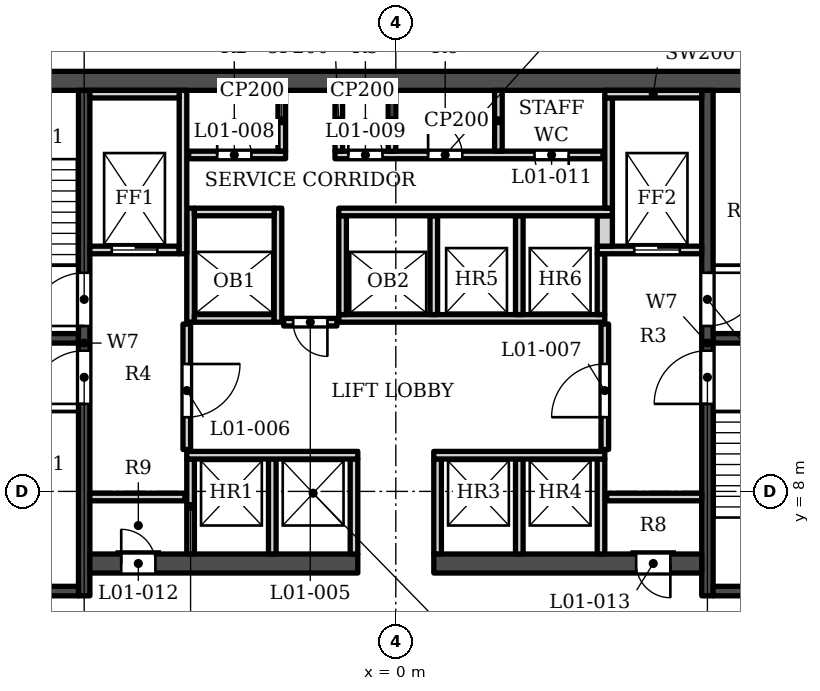
"""IFC4 building model, lengths in metres.
Left out: names, types, materials, properties, quantities, classifications, styles, units other than length and angle.
Written with IfcOpenShell. Run it as: python <this file> out.ifc"""

import sys

from ifc_helpers import new_model, si_unit, direction, frame, frame_2d, origin, place, context, subcontext, project, spatial, rectangle, extrude, element, fill, save


model = new_model("IFC4")
c1 = context("Model", 3, precision=1e-05, world=origin(), true_north=direction((0.0, 1.0)))
c2 = subcontext(c1, "Body", "Model", "MODEL_VIEW")
j1 = project(units=[si_unit("LENGTHUNIT", "METRE"), si_unit("PLANEANGLEUNIT", "RADIAN")], contexts=[c1])
p1 = place(None, origin())
s1 = spatial("IfcSite", under=j1, at=p1, CompositionType="ELEMENT")
p2 = place(p1, origin())
s2 = spatial("IfcBuilding", under=s1, at=p2, CompositionType="ELEMENT")
p3 = place(p2, frame((0.0, 0.0, 9.0)))
s3 = spatial("IfcBuildingStorey", under=s2, at=p3, CompositionType="ELEMENT", Elevation=9.0)
p4 = place(p3, frame((-16.9, 18.802, 0.0), z_axis=(0.0, 0.0, 1.0), x_axis=(1.0, 0.0, 0.0)))
e1 = element("IfcWall", 1, at=p4, inside=s3, PredefinedType="SHEAR", context=c2, shape_type="SweptSolid", body=[
    extrude(rectangle(XDim=33.8, YDim=0.5, at=frame_2d((16.9, 0.0))), origin(), (0.0, 0.0, 1.0), 11.0),
])
p5 = place(p3, frame((-8.2, 5.253, 0.0), z_axis=(0.0, 0.0, 1.0), x_axis=(0.0, 1.0, 0.0)))
e2 = element("IfcWall", 2, at=p5, inside=s3, PredefinedType="SHEAR", context=c2, shape_type="SweptSolid", body=[
    extrude(rectangle(XDim=13.3, YDim=0.3, at=frame_2d((6.65, 0.0))), origin(), (0.0, 0.0, 1.0), 11.0),
])
p6 = place(p5, frame((7.1, 0.0, 0.0)))
e3 = element("IfcOpeningElement", 3, at=p6, cuts=e2, PredefinedType="OPENING", context=c2, shape_type="SweptSolid", body=[
    extrude(rectangle(XDim=1.4, YDim=2.1, at=frame_2d((0.7, 1.05))), frame((0.0, 0.16, 0.0), z_axis=(0.0, -1.0, 0.0), x_axis=(1.0, 0.0, 0.0)), (0.0, 0.0, 1.0), 0.32),
])
p7 = place(p5, frame((5.05, 0.0, 0.0)))
e4 = element("IfcOpeningElement", 4, at=p7, cuts=e2, PredefinedType="OPENING", context=c2, shape_type="SweptSolid", body=[
    extrude(rectangle(XDim=1.4, YDim=2.1, at=frame_2d((0.7, 1.05))), frame((0.0, 0.16, 0.0), z_axis=(0.0, -1.0, 0.0), x_axis=(1.0, 0.0, 0.0)), (0.0, 0.0, 1.0), 0.32),
])
for number, where, z_axis, x_axis in (
    (5, (-12.1, 12.028, 0.0), (0.0, 0.0, 1.0), (1.0, 0.0, 0.0)),
    (6, (-12.1, 5.378, 0.0), (0.0, 0.0, 1.0), (1.0, 0.0, 0.0)),
):
    element("IfcWall", number, at=place(p3, frame(where, z_axis=z_axis, x_axis=x_axis)), inside=s3, PredefinedType="SHEAR", context=c2, shape_type="SweptSolid", body=[
        extrude(rectangle(XDim=3.75, YDim=0.25, at=frame_2d((1.875, 0.0))), origin(), (0.0, 0.0, 1.0), 11.0),
    ])
p8 = place(p3, frame((8.2, 5.253, 0.0), z_axis=(0.0, 0.0, 1.0), x_axis=(0.0, 1.0, 0.0)))
e7 = element("IfcWall", 7, at=p8, inside=s3, PredefinedType="SHEAR", context=c2, shape_type="SweptSolid", body=[
    extrude(rectangle(XDim=13.3, YDim=0.3, at=frame_2d((6.65, 0.0))), origin(), (0.0, 0.0, 1.0), 11.0),
])
p9 = place(p8, frame((7.1, 0.0, 0.0)))
e8 = element("IfcOpeningElement", 8, at=p9, cuts=e7, PredefinedType="OPENING", context=c2, shape_type="SweptSolid", body=[
    extrude(rectangle(XDim=1.4, YDim=2.1, at=frame_2d((0.7, 1.05))), frame((0.0, 0.16, 0.0), z_axis=(0.0, -1.0, 0.0), x_axis=(1.0, 0.0, 0.0)), (0.0, 0.0, 1.0), 0.32),
])
p10 = place(p8, frame((5.05, 0.0, 0.0)))
e9 = element("IfcOpeningElement", 9, at=p10, cuts=e7, PredefinedType="OPENING", context=c2, shape_type="SweptSolid", body=[
    extrude(rectangle(XDim=1.4, YDim=2.1, at=frame_2d((0.7, 1.05))), frame((0.0, 0.16, 0.0), z_axis=(0.0, -1.0, 0.0), x_axis=(1.0, 0.0, 0.0)), (0.0, 0.0, 1.0), 0.32),
])
for number, where, z_axis, x_axis in (
    (10, (8.35, 12.028, 0.0), (0.0, 0.0, 1.0), (1.0, 0.0, 0.0)),
    (11, (8.35, 5.378, 0.0), (0.0, 0.0, 1.0), (1.0, 0.0, 0.0)),
):
    element("IfcWall", number, at=place(p3, frame(where, z_axis=z_axis, x_axis=x_axis)), inside=s3, PredefinedType="SHEAR", context=c2, shape_type="SweptSolid", body=[
        extrude(rectangle(XDim=3.75, YDim=0.25, at=frame_2d((1.875, 0.0))), origin(), (0.0, 0.0, 1.0), 11.0),
    ])
p11 = place(p3, frame((-8.05, 6.103, 0.0), z_axis=(0.0, 0.0, 1.0), x_axis=(1.0, 0.0, 0.0)))
e12 = element("IfcWall", 12, at=p11, inside=s3, PredefinedType="SHEAR", context=c2, shape_type="SweptSolid", body=[
    extrude(rectangle(XDim=7.05, YDim=0.5, at=frame_2d((3.525, 0.0))), origin(), (0.0, 0.0, 1.0), 11.0),
])
p12 = place(p11, frame((0.825, 0.0, 0.0)))
e13 = element("IfcOpeningElement", 13, at=p12, cuts=e12, PredefinedType="OPENING", context=c2, shape_type="SweptSolid", body=[
    extrude(rectangle(XDim=0.9, YDim=2.1, at=frame_2d((0.45, 1.05))), frame((0.0, 0.26, 0.0), z_axis=(0.0, -1.0, 0.0), x_axis=(1.0, 0.0, 0.0)), (0.0, 0.0, 1.0), 0.52),
])
p13 = place(p3, frame((1.0, 6.103, 0.0), z_axis=(0.0, 0.0, 1.0), x_axis=(1.0, 0.0, 0.0)))
e14 = element("IfcWall", 14, at=p13, inside=s3, PredefinedType="SHEAR", context=c2, shape_type="SweptSolid", body=[
    extrude(rectangle(XDim=7.05, YDim=0.5, at=frame_2d((3.525, 0.0))), origin(), (0.0, 0.0, 1.0), 11.0),
])
p14 = place(p13, frame((5.325, 0.0, 0.0)))
e15 = element("IfcOpeningElement", 15, at=p14, cuts=e14, PredefinedType="OPENING", context=c2, shape_type="SweptSolid", body=[
    extrude(rectangle(XDim=0.9, YDim=2.1, at=frame_2d((0.45, 1.05))), frame((0.0, 0.26, 0.0), z_axis=(0.0, -1.0, 0.0), x_axis=(1.0, 0.0, 0.0)), (0.0, 0.0, 1.0), 0.52),
])
for number, where, z_axis, x_axis in (
    (16, (-5.4, 6.353, 0.0), (0.0, 0.0, 1.0), (0.0, 1.0, 0.0)),
    (17, (-3.25, 6.353, 0.0), (0.0, 0.0, 1.0), (0.0, 1.0, 0.0)),
    (18, (-1.1, 6.353, 0.0), (0.0, 0.0, 1.0), (0.0, 1.0, 0.0)),
    (19, (1.1, 6.353, 0.0), (0.0, 0.0, 1.0), (0.0, 1.0, 0.0)),
    (20, (3.25, 6.353, 0.0), (0.0, 0.0, 1.0), (0.0, 1.0, 0.0)),
    (21, (5.4, 6.353, 0.0), (0.0, 0.0, 1.0), (0.0, 1.0, 0.0)),
    (22, (-8.05, 7.853, 0.0), (0.0, 0.0, 1.0), (1.0, 0.0, 0.0)),
    (23, (5.55, 7.853, 0.0), (0.0, 0.0, 1.0), (1.0, 0.0, 0.0)),
):
    element("IfcWall", number, at=place(p3, frame(where, z_axis=z_axis, x_axis=x_axis)), inside=s3, PredefinedType="SOLIDWALL", context=c2, shape_type="SweptSolid", body=[
        extrude(rectangle(XDim=2.5, YDim=0.2, at=frame_2d((1.25, 0.0))), origin(), (0.0, 0.0, 1.0), 10.5),
    ])
for number, where, z_axis, x_axis in (
    (24, (-5.5, 8.953, 0.0), (0.0, 0.0, 1.0), (1.0, 0.0, 0.0)),
    (25, (1.0, 8.953, 0.0), (0.0, 0.0, 1.0), (1.0, 0.0, 0.0)),
):
    element("IfcWall", number, at=place(p3, frame(where, z_axis=z_axis, x_axis=x_axis)), inside=s3, PredefinedType="SOLIDWALL", context=c2, shape_type="SweptSolid", body=[
        extrude(rectangle(XDim=4.5, YDim=0.2, at=frame_2d((2.25, 0.0))), origin(), (0.0, 0.0, 1.0), 10.5),
    ])
p15 = place(p3, frame((-5.5, 9.103, 0.0), z_axis=(0.0, 0.0, 1.0), x_axis=(0.0, 1.0, 0.0)))
e26 = element("IfcWall", 26, at=p15, inside=s3, PredefinedType="SOLIDWALL", context=c2, shape_type="SweptSolid", body=[
    extrude(rectangle(XDim=3.3, YDim=0.2, at=frame_2d((1.65, 0.0))), origin(), (0.0, 0.0, 1.0), 10.5),
])
p16 = place(p15, frame((0.85, 0.0, 0.0)))
e27 = element("IfcOpeningElement", 27, at=p16, cuts=e26, PredefinedType="OPENING", context=c2, shape_type="SweptSolid", body=[
    extrude(rectangle(XDim=1.4, YDim=2.1, at=frame_2d((0.7, 1.05))), frame((0.0, 0.11, 0.0), z_axis=(0.0, -1.0, 0.0), x_axis=(1.0, 0.0, 0.0)), (0.0, 0.0, 1.0), 0.22),
])
p17 = place(p3, frame((5.5, 9.103, 0.0), z_axis=(0.0, 0.0, 1.0), x_axis=(0.0, 1.0, 0.0)))
e28 = element("IfcWall", 28, at=p17, inside=s3, PredefinedType="SOLIDWALL", context=c2, shape_type="SweptSolid", body=[
    extrude(rectangle(XDim=3.3, YDim=0.2, at=frame_2d((1.65, 0.0))), origin(), (0.0, 0.0, 1.0), 10.5),
])
p18 = place(p17, frame((0.85, 0.0, 0.0)))
e29 = element("IfcOpeningElement", 29, at=p18, cuts=e28, PredefinedType="OPENING", context=c2, shape_type="SweptSolid", body=[
    extrude(rectangle(XDim=1.4, YDim=2.1, at=frame_2d((0.7, 1.05))), frame((0.0, 0.11, 0.0), z_axis=(0.0, -1.0, 0.0), x_axis=(1.0, 0.0, 0.0)), (0.0, 0.0, 1.0), 0.22),
])
p19 = place(p3, frame((-2.95, 12.453, 0.0), z_axis=(0.0, 0.0, 1.0), x_axis=(1.0, 0.0, 0.0)))
e30 = element("IfcWall", 30, at=p19, inside=s3, PredefinedType="SOLIDWALL", context=c2, shape_type="SweptSolid", body=[
    extrude(rectangle(XDim=1.4, YDim=0.2, at=frame_2d((0.7, 0.0))), origin(), (0.0, 0.0, 1.0), 10.5),
])
p20 = place(p19, frame((0.25, 0.0, 0.0)))
e31 = element("IfcOpeningElement", 31, at=p20, cuts=e30, PredefinedType="OPENING", context=c2, shape_type="SweptSolid", body=[
    extrude(rectangle(XDim=0.9, YDim=2.1, at=frame_2d((0.45, 1.05))), frame((0.0, 0.11, 0.0), z_axis=(0.0, -1.0, 0.0), x_axis=(1.0, 0.0, 0.0)), (0.0, 0.0, 1.0), 0.22),
])
p21 = place(p3, frame((-5.4, 12.453, 0.0), z_axis=(0.0, 0.0, 1.0), x_axis=(0.0, 1.0, 0.0)))
e32 = element("IfcWall", 32, at=p21, inside=s3, PredefinedType="SOLIDWALL", context=c2, shape_type="SweptSolid", body=[
    extrude(rectangle(XDim=3.0, YDim=0.2, at=frame_2d((1.5, 0.0))), origin(), (0.0, 0.0, 1.0), 10.5),
])
p22 = place(p3, frame((-5.3, 12.552, 0.0), z_axis=(0.0, 0.0, 1.0), x_axis=(1.0, 0.0, 0.0)))
e33 = element("IfcWall", 33, at=p22, inside=s3, PredefinedType="SOLIDWALL", context=c2, shape_type="SweptSolid", body=[
    extrude(rectangle(XDim=2.1, YDim=0.2, at=frame_2d((1.05, 0.0))), origin(), (0.0, 0.0, 1.0), 10.5),
])
p23 = place(p3, frame((-3.1, 12.453, 0.0), z_axis=(0.0, 0.0, 1.0), x_axis=(0.0, 1.0, 0.0)))
e34 = element("IfcWall", 34, at=p23, inside=s3, PredefinedType="SOLIDWALL", context=c2, shape_type="SweptSolid", body=[
    extrude(rectangle(XDim=3.0, YDim=0.2, at=frame_2d((1.5, 0.0))), origin(), (0.0, 0.0, 1.0), 10.5),
])
p24 = place(p3, frame((-1.5, 12.552, 0.0), z_axis=(0.0, 0.0, 1.0), x_axis=(1.0, 0.0, 0.0)))
e35 = element("IfcWall", 35, at=p24, inside=s3, PredefinedType="SOLIDWALL", context=c2, shape_type="SweptSolid", body=[
    extrude(rectangle(XDim=7.0, YDim=0.2, at=frame_2d((3.5, 0.0))), origin(), (0.0, 0.0, 1.0), 10.5),
])
for number, where, z_axis, x_axis in (
    (36, (-1.4, 12.653, 0.0), (0.0, 0.0, 1.0), (0.0, 1.0, 0.0)),
    (37, (1.0, 12.653, 0.0), (0.0, 0.0, 1.0), (0.0, 1.0, 0.0)),
    (38, (3.25, 12.653, 0.0), (0.0, 0.0, 1.0), (0.0, 1.0, 0.0)),
):
    element("IfcWall", number, at=place(p3, frame(where, z_axis=z_axis, x_axis=x_axis)), inside=s3, PredefinedType="SOLIDWALL", context=c2, shape_type="SweptSolid", body=[
        extrude(rectangle(XDim=2.6, YDim=0.2, at=frame_2d((1.3, 0.0))), origin(), (0.0, 0.0, 1.0), 10.5),
    ])
p25 = place(p3, frame((5.4, 12.653, 0.0), z_axis=(0.0, 0.0, 1.0), x_axis=(0.0, 1.0, 0.0)))
e39 = element("IfcWall", 39, at=p25, inside=s3, PredefinedType="SOLIDWALL", context=c2, shape_type="SweptSolid", body=[
    extrude(rectangle(XDim=1.6, YDim=0.2, at=frame_2d((0.8, 0.0))), origin(), (0.0, 0.0, 1.0), 10.5),
])
p26 = place(p3, frame((-8.05, 14.353, 0.0), z_axis=(0.0, 0.0, 1.0), x_axis=(1.0, 0.0, 0.0)))
e40 = element("IfcWall", 40, at=p26, inside=s3, PredefinedType="SOLIDWALL", context=c2, shape_type="SweptSolid", body=[
    extrude(rectangle(XDim=2.35, YDim=0.2, at=frame_2d((1.175, 0.0))), origin(), (0.0, 0.0, 1.0), 10.5),
])
p27 = place(p26, frame((0.575, 0.0, 0.0)))
e41 = element("IfcOpeningElement", 41, at=p27, cuts=e40, PredefinedType="OPENING", context=c2, shape_type="SweptSolid", body=[
    extrude(rectangle(XDim=1.2, YDim=2.1, at=frame_2d((0.6, 1.05))), frame((0.0, 0.11, 0.0), z_axis=(0.0, -1.0, 0.0), x_axis=(1.0, 0.0, 0.0)), (0.0, 0.0, 1.0), 0.22),
])
p28 = place(p3, frame((-5.6, 14.253, 0.0), z_axis=(0.0, 0.0, 1.0), x_axis=(0.0, 1.0, 0.0)))
e42 = element("IfcWall", 42, at=p28, inside=s3, PredefinedType="SOLIDWALL", context=c2, shape_type="SweptSolid", body=[
    extrude(rectangle(XDim=4.3, YDim=0.2, at=frame_2d((2.15, 0.0))), origin(), (0.0, 0.0, 1.0), 10.5),
])
p29 = place(p3, frame((5.3, 14.353, 0.0), z_axis=(0.0, 0.0, 1.0), x_axis=(1.0, 0.0, 0.0)))
e43 = element("IfcWall", 43, at=p29, inside=s3, PredefinedType="SOLIDWALL", context=c2, shape_type="SweptSolid", body=[
    extrude(rectangle(XDim=2.75, YDim=0.2, at=frame_2d((1.375, 0.0))), origin(), (0.0, 0.0, 1.0), 10.5),
])
p30 = place(p29, frame((0.975, 0.0, 0.0)))
e44 = element("IfcOpeningElement", 44, at=p30, cuts=e43, PredefinedType="OPENING", context=c2, shape_type="SweptSolid", body=[
    extrude(rectangle(XDim=1.2, YDim=2.1, at=frame_2d((0.6, 1.05))), frame((0.0, 0.11, 0.0), z_axis=(0.0, -1.0, 0.0), x_axis=(1.0, 0.0, 0.0)), (0.0, 0.0, 1.0), 0.22),
])
p31 = place(p3, frame((5.5, 14.453, 0.0), z_axis=(0.0, 0.0, 1.0), x_axis=(0.0, 1.0, 0.0)))
e45 = element("IfcWall", 45, at=p31, inside=s3, PredefinedType="SOLIDWALL", context=c2, shape_type="SweptSolid", body=[
    extrude(rectangle(XDim=0.8, YDim=0.4, at=frame_2d((0.4, 0.0))), origin(), (0.0, 0.0, 1.0), 10.5),
])
p32 = place(p3, frame((-5.3, 15.353, 0.0), z_axis=(0.0, 0.0, 1.0), x_axis=(1.0, 0.0, 0.0)))
e46 = element("IfcWall", 46, at=p32, inside=s3, PredefinedType="SOLIDWALL", context=c2, shape_type="SweptSolid", body=[
    extrude(rectangle(XDim=2.1, YDim=0.2, at=frame_2d((1.05, 0.0))), origin(), (0.0, 0.0, 1.0), 10.5),
])
p33 = place(p3, frame((-1.5, 15.353, 0.0), z_axis=(0.0, 0.0, 1.0), x_axis=(1.0, 0.0, 0.0)))
e47 = element("IfcWall", 47, at=p33, inside=s3, PredefinedType="SOLIDWALL", context=c2, shape_type="SweptSolid", body=[
    extrude(rectangle(XDim=7.2, YDim=0.2, at=frame_2d((3.6, 0.0))), origin(), (0.0, 0.0, 1.0), 10.5),
])
p34 = place(p3, frame((5.6, 15.453, 0.0), z_axis=(0.0, 0.0, 1.0), x_axis=(0.0, 1.0, 0.0)))
e48 = element("IfcWall", 48, at=p34, inside=s3, PredefinedType="SOLIDWALL", context=c2, shape_type="SweptSolid", body=[
    extrude(rectangle(XDim=2.9, YDim=0.2, at=frame_2d((1.45, 0.0))), origin(), (0.0, 0.0, 1.0), 10.5),
])
p35 = place(p3, frame((-5.45, 16.853, 0.0), z_axis=(0.0, 0.0, 1.0), x_axis=(1.0, 0.0, 0.0)))
e49 = element("IfcWall", 49, at=p35, inside=s3, PredefinedType="SOLIDWALL", context=c2, shape_type="SweptSolid", body=[
    extrude(rectangle(XDim=2.55, YDim=0.2, at=frame_2d((1.275, 0.0))), origin(), (0.0, 0.0, 1.0), 10.5),
])
p36 = place(p35, frame((0.75, 0.0, 0.0)))
e50 = element("IfcOpeningElement", 50, at=p36, cuts=e49, PredefinedType="OPENING", context=c2, shape_type="SweptSolid", body=[
    extrude(rectangle(XDim=0.9, YDim=2.1, at=frame_2d((0.45, 1.05))), frame((0.0, 0.11, 0.0), z_axis=(0.0, -1.0, 0.0), x_axis=(1.0, 0.0, 0.0)), (0.0, 0.0, 1.0), 0.22),
])
p37 = place(p3, frame((-1.6, 16.853, 0.0), z_axis=(0.0, 0.0, 1.0), x_axis=(1.0, 0.0, 0.0)))
e51 = element("IfcWall", 51, at=p37, inside=s3, PredefinedType="SOLIDWALL", context=c2, shape_type="SweptSolid", body=[
    extrude(rectangle(XDim=7.05, YDim=0.2, at=frame_2d((3.525, 0.0))), origin(), (0.0, 0.0, 1.0), 10.5),
])
p38 = place(p37, frame((0.35, 0.0, 0.0)))
e52 = element("IfcOpeningElement", 52, at=p38, cuts=e51, PredefinedType="OPENING", context=c2, shape_type="SweptSolid", body=[
    extrude(rectangle(XDim=0.9, YDim=2.1, at=frame_2d((0.45, 1.05))), frame((0.0, 0.11, 0.0), z_axis=(0.0, -1.0, 0.0), x_axis=(1.0, 0.0, 0.0)), (0.0, 0.0, 1.0), 0.22),
])
p39 = place(p37, frame((2.45, 0.0, 0.0)))
e53 = element("IfcOpeningElement", 53, at=p39, cuts=e51, PredefinedType="OPENING", context=c2, shape_type="SweptSolid", body=[
    extrude(rectangle(XDim=0.9, YDim=2.1, at=frame_2d((0.45, 1.05))), frame((0.0, 0.11, 0.0), z_axis=(0.0, -1.0, 0.0), x_axis=(1.0, 0.0, 0.0)), (0.0, 0.0, 1.0), 0.22),
])
p40 = place(p37, frame((5.25, 0.0, 0.0)))
e54 = element("IfcOpeningElement", 54, at=p40, cuts=e51, PredefinedType="OPENING", context=c2, shape_type="SweptSolid", body=[
    extrude(rectangle(XDim=0.9, YDim=2.1, at=frame_2d((0.45, 1.05))), frame((0.0, 0.11, 0.0), z_axis=(0.0, -1.0, 0.0), x_axis=(1.0, 0.0, 0.0)), (0.0, 0.0, 1.0), 0.22),
])
for number, where, z_axis, x_axis in (
    (55, (-3.0, 16.953, 0.0), (0.0, 0.0, 1.0), (0.0, 1.0, 0.0)),
    (56, (-1.5, 16.953, 0.0), (0.0, 0.0, 1.0), (0.0, 1.0, 0.0)),
    (57, (-0.1, 16.953, 0.0), (0.0, 0.0, 1.0), (0.0, 1.0, 0.0)),
    (58, (2.7, 16.953, 0.0), (0.0, 0.0, 1.0), (0.0, 1.0, 0.0)),
):
    element("IfcWall", number, at=place(p3, frame(where, z_axis=z_axis, x_axis=x_axis)), inside=s3, PredefinedType="PARTITIONING", context=c2, shape_type="SweptSolid", body=[
        extrude(rectangle(XDim=1.6, YDim=0.2, at=frame_2d((0.8, 0.0))), origin(), (0.0, 0.0, 1.0), 10.5),
    ])
p41 = place(p3, frame((-8.05, 18.453, 0.0), z_axis=(0.0, 0.0, 1.0), x_axis=(1.0, 0.0, 0.0)))
e59 = element("IfcWall", 59, at=p41, inside=s3, PredefinedType="SOLIDWALL", context=c2, shape_type="SweptSolid", body=[
    extrude(rectangle(XDim=2.35, YDim=0.2, at=frame_2d((1.175, 0.0))), origin(), (0.0, 0.0, 1.0), 10.5),
])
p42 = place(p3, frame((5.5, 18.453, 0.0), z_axis=(0.0, 0.0, 1.0), x_axis=(1.0, 0.0, 0.0)))
e60 = element("IfcWall", 60, at=p42, inside=s3, PredefinedType="SOLIDWALL", context=c2, shape_type="SweptSolid", body=[
    extrude(rectangle(XDim=2.55, YDim=0.2, at=frame_2d((1.275, 0.0))), origin(), (0.0, 0.0, 1.0), 10.5),
])
p43 = place(p27, origin())
e61 = element("IfcDoor", 61, at=p43, inside=s3, OperationType="DOUBLE_DOOR_SLIDING", PredefinedType="DOOR", context=c2, shape_type="SweptSolid", body=[
    extrude(rectangle(XDim=1.2, YDim=2.1, at=frame_2d((0.6, 1.05))), frame((0.0, 0.025, 0.0), z_axis=(0.0, -1.0, 0.0), x_axis=(1.0, 0.0, 0.0)), (0.0, 0.0, 1.0), 0.05),
])
fill(e41, e61)
p44 = place(p30, origin())
e62 = element("IfcDoor", 62, at=p44, inside=s3, OperationType="DOUBLE_DOOR_SLIDING", PredefinedType="DOOR", context=c2, shape_type="SweptSolid", body=[
    extrude(rectangle(XDim=1.2, YDim=2.1, at=frame_2d((0.6, 1.05))), frame((0.0, 0.025, 0.0), z_axis=(0.0, -1.0, 0.0), x_axis=(1.0, 0.0, 0.0)), (0.0, 0.0, 1.0), 0.05),
])
fill(e44, e62)
p45 = place(p6, origin())
e63 = element("IfcDoor", 63, at=p45, inside=s3, OperationType="SINGLE_SWING_LEFT", PredefinedType="DOOR", context=c2, shape_type="SweptSolid", body=[
    extrude(rectangle(XDim=1.4, YDim=2.1, at=frame_2d((0.7, 1.05))), frame((0.0, 0.025, 0.0), z_axis=(0.0, -1.0, 0.0), x_axis=(1.0, 0.0, 0.0)), (0.0, 0.0, 1.0), 0.05),
])
fill(e3, e63)
p46 = place(p7, origin())
e64 = element("IfcDoor", 64, at=p46, inside=s3, OperationType="SINGLE_SWING_LEFT", PredefinedType="DOOR", context=c2, shape_type="SweptSolid", body=[
    extrude(rectangle(XDim=1.4, YDim=2.1, at=frame_2d((0.7, 1.05))), frame((0.0, 0.025, 0.0), z_axis=(0.0, -1.0, 0.0), x_axis=(1.0, 0.0, 0.0)), (0.0, 0.0, 1.0), 0.05),
])
fill(e4, e64)
p47 = place(p9, origin())
e65 = element("IfcDoor", 65, at=p47, inside=s3, OperationType="SINGLE_SWING_RIGHT", PredefinedType="DOOR", context=c2, shape_type="SweptSolid", body=[
    extrude(rectangle(XDim=1.4, YDim=2.1, at=frame_2d((0.7, 1.05))), frame((0.0, 0.025, 0.0), z_axis=(0.0, -1.0, 0.0), x_axis=(1.0, 0.0, 0.0)), (0.0, 0.0, 1.0), 0.05),
])
fill(e8, e65)
p48 = place(p10, origin())
e66 = element("IfcDoor", 66, at=p48, inside=s3, OperationType="SINGLE_SWING_LEFT", PredefinedType="DOOR", context=c2, shape_type="SweptSolid", body=[
    extrude(rectangle(XDim=1.4, YDim=2.1, at=frame_2d((0.7, 1.05))), frame((0.0, 0.025, 0.0), z_axis=(0.0, -1.0, 0.0), x_axis=(1.0, 0.0, 0.0)), (0.0, 0.0, 1.0), 0.05),
])
fill(e9, e66)
p49 = place(p20, origin())
e67 = element("IfcDoor", 67, at=p49, inside=s3, OperationType="SINGLE_SWING_RIGHT", PredefinedType="DOOR", context=c2, shape_type="SweptSolid", body=[
    extrude(rectangle(XDim=0.9, YDim=2.1, at=frame_2d((0.45, 1.05))), frame((0.0, 0.025, 0.0), z_axis=(0.0, -1.0, 0.0), x_axis=(1.0, 0.0, 0.0)), (0.0, 0.0, 1.0), 0.05),
])
fill(e31, e67)
p50 = place(p16, origin())
e68 = element("IfcDoor", 68, at=p50, inside=s3, OperationType="SINGLE_SWING_RIGHT", PredefinedType="DOOR", context=c2, shape_type="SweptSolid", body=[
    extrude(rectangle(XDim=1.4, YDim=2.1, at=frame_2d((0.7, 1.05))), frame((0.0, 0.025, 0.0), z_axis=(0.0, -1.0, 0.0), x_axis=(1.0, 0.0, 0.0)), (0.0, 0.0, 1.0), 0.05),
])
fill(e27, e68)
p51 = place(p18, origin())
e69 = element("IfcDoor", 69, at=p51, inside=s3, OperationType="SINGLE_SWING_LEFT", PredefinedType="DOOR", context=c2, shape_type="SweptSolid", body=[
    extrude(rectangle(XDim=1.4, YDim=2.1, at=frame_2d((0.7, 1.05))), frame((0.0, 0.025, 0.0), z_axis=(0.0, -1.0, 0.0), x_axis=(1.0, 0.0, 0.0)), (0.0, 0.0, 1.0), 0.05),
])
fill(e29, e69)
p52 = place(p36, origin())
e70 = element("IfcDoor", 70, at=p52, inside=s3, OperationType="SINGLE_SWING_LEFT", PredefinedType="DOOR", context=c2, shape_type="SweptSolid", body=[
    extrude(rectangle(XDim=0.9, YDim=2.1, at=frame_2d((0.45, 1.05))), frame((0.0, 0.025, 0.0), z_axis=(0.0, -1.0, 0.0), x_axis=(1.0, 0.0, 0.0)), (0.0, 0.0, 1.0), 0.05),
])
fill(e50, e70)
p53 = place(p38, origin())
e71 = element("IfcDoor", 71, at=p53, inside=s3, OperationType="SINGLE_SWING_LEFT", PredefinedType="DOOR", context=c2, shape_type="SweptSolid", body=[
    extrude(rectangle(XDim=0.9, YDim=2.1, at=frame_2d((0.45, 1.05))), frame((0.0, 0.025, 0.0), z_axis=(0.0, -1.0, 0.0), x_axis=(1.0, 0.0, 0.0)), (0.0, 0.0, 1.0), 0.05),
])
fill(e52, e71)
p54 = place(p39, origin())
e72 = element("IfcDoor", 72, at=p54, inside=s3, OperationType="SINGLE_SWING_LEFT", PredefinedType="DOOR", context=c2, shape_type="SweptSolid", body=[
    extrude(rectangle(XDim=0.9, YDim=2.1, at=frame_2d((0.45, 1.05))), frame((0.0, 0.025, 0.0), z_axis=(0.0, -1.0, 0.0), x_axis=(1.0, 0.0, 0.0)), (0.0, 0.0, 1.0), 0.05),
])
fill(e53, e72)
p55 = place(p40, origin())
e73 = element("IfcDoor", 73, at=p55, inside=s3, OperationType="SINGLE_SWING_RIGHT", PredefinedType="DOOR", context=c2, shape_type="SweptSolid", body=[
    extrude(rectangle(XDim=0.9, YDim=2.1, at=frame_2d((0.45, 1.05))), frame((0.0, 0.025, 0.0), z_axis=(0.0, -1.0, 0.0), x_axis=(1.0, 0.0, 0.0)), (0.0, 0.0, 1.0), 0.05),
])
fill(e54, e73)
p56 = place(p12, origin())
e74 = element("IfcDoor", 74, at=p56, inside=s3, OperationType="SINGLE_SWING_LEFT", PredefinedType="DOOR", context=c2, shape_type="SweptSolid", body=[
    extrude(rectangle(XDim=0.9, YDim=2.1, at=frame_2d((0.45, 1.05))), frame((0.0, 0.025, 0.0), z_axis=(0.0, -1.0, 0.0), x_axis=(1.0, 0.0, 0.0)), (0.0, 0.0, 1.0), 0.05),
])
fill(e13, e74)
p57 = place(p14, origin())
e75 = element("IfcDoor", 75, at=p57, inside=s3, OperationType="SINGLE_SWING_RIGHT", PredefinedType="DOOR", context=c2, shape_type="SweptSolid", body=[
    extrude(rectangle(XDim=0.9, YDim=2.1, at=frame_2d((0.45, 1.05))), frame((0.0, 0.025, 0.0), z_axis=(0.0, -1.0, 0.0), x_axis=(1.0, 0.0, 0.0)), (0.0, 0.0, 1.0), 0.05),
])
fill(e15, e75)
save(model, sys.argv[1])
